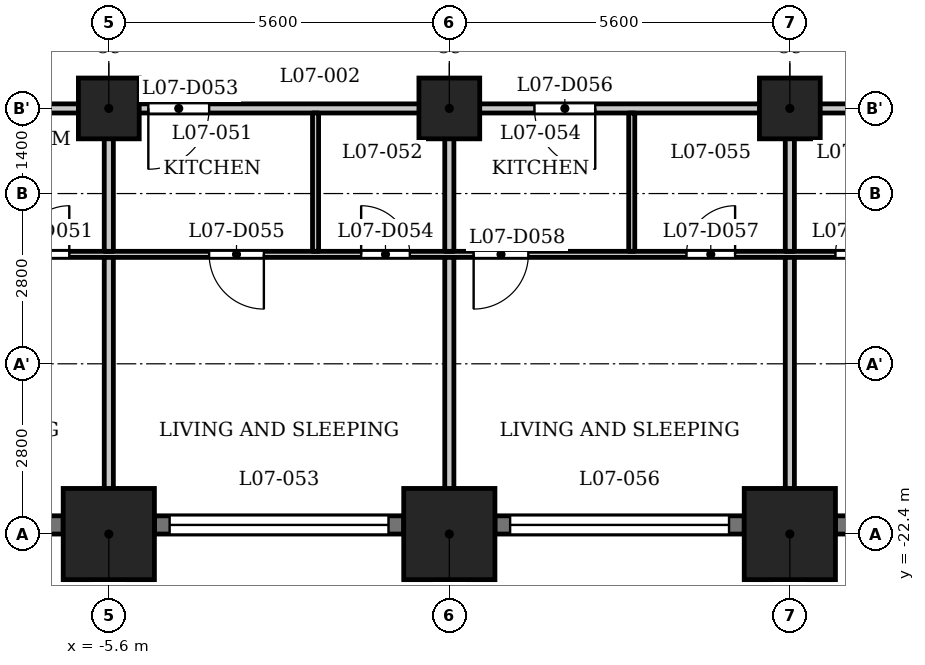
"""IFC4 building model, lengths in metres.
Left out: names, types, materials, properties, quantities, classifications, styles, units other than length and angle.
Written with IfcOpenShell. Run it as: python <this file> out.ifc"""

import sys

from ifc_helpers import new_model, si_unit, direction, frame, frame_2d, origin, origin_2d, place, context, subcontext, project, spatial, rectangle, extrude, element, fill, save


model = new_model("IFC4")
c1 = context("Model", 3, precision=1e-05, world=origin(), true_north=direction((0.0, 1.0)))
c2 = subcontext(c1, "Body", "Model", "MODEL_VIEW")
j1 = project(units=[si_unit("LENGTHUNIT", "METRE"), si_unit("PLANEANGLEUNIT", "RADIAN")], contexts=[c1])
p1 = place(None, origin())
s1 = spatial("IfcSite", under=j1, at=p1, CompositionType="ELEMENT")
p2 = place(p1, origin())
s2 = spatial("IfcBuilding", under=s1, at=p2, CompositionType="ELEMENT")
p3 = place(p2, frame((0.0, 0.0, 34.0)))
s3 = spatial("IfcBuildingStorey", under=s2, at=p3, CompositionType="ELEMENT", Elevation=34.0)
for number, where, z_axis, x_axis in (
    (1, (-5.6, -22.4, 0.0), (0.0, 0.0, 1.0), (1.0, 0.0, 0.0)),
    (2, (0.0, -22.4, 0.0), (0.0, 0.0, 1.0), (1.0, 0.0, 0.0)),
    (3, (5.6, -22.4, 0.0), (0.0, 0.0, 1.0), (1.0, 0.0, 0.0)),
):
    element("IfcColumn", number, at=place(p3, frame(where, z_axis=z_axis, x_axis=x_axis)), inside=s3, PredefinedType="COLUMN", context=c2, shape_type="SweptSolid", body=[
        extrude(rectangle(XDim=1.5, YDim=1.5, at=origin_2d()), origin(), (0.0, 0.0, 1.0), 3.5),
    ])
for number, where, z_axis, x_axis in (
    (4, (-5.6, -15.4, 0.0), (0.0, 0.0, 1.0), (1.0, 0.0, 0.0)),
    (5, (0.0, -15.4, 0.0), (0.0, 0.0, 1.0), (1.0, 0.0, 0.0)),
    (6, (5.6, -15.4, 0.0), (0.0, 0.0, 1.0), (1.0, 0.0, 0.0)),
):
    element("IfcColumn", number, at=place(p3, frame(where, z_axis=z_axis, x_axis=x_axis)), inside=s3, PredefinedType="COLUMN", context=c2, shape_type="SweptSolid", body=[
        extrude(rectangle(XDim=1.0, YDim=1.0, at=origin_2d()), origin(), (0.0, 0.0, 1.0), 3.5),
    ])
p4 = place(p3, frame((-10.45, -22.25, 0.0), z_axis=(0.0, 0.0, 1.0), x_axis=(1.0, 0.0, 0.0)))
e7 = element("IfcWall", 7, at=p4, inside=s3, PredefinedType="SOLIDWALL", context=c2, shape_type="SweptSolid", body=[
    extrude(rectangle(XDim=4.1, YDim=0.3, at=frame_2d((2.05, 0.0))), origin(), (0.0, 0.0, 1.0), 2.35),
])
p5 = place(p4, frame((0.25, 0.0, 1.2)))
e8 = element("IfcOpeningElement", 8, at=p5, cuts=e7, PredefinedType="OPENING", context=c2, shape_type="SweptSolid", body=[
    extrude(rectangle(XDim=3.6, YDim=0.95, at=frame_2d((1.8, 0.475))), frame((0.0, 0.16, 0.0), z_axis=(0.0, -1.0, 0.0), x_axis=(1.0, 0.0, 0.0)), (0.0, 0.0, 1.0), 0.32),
])
p6 = place(p3, frame((-4.85, -22.25, 0.0), z_axis=(0.0, 0.0, 1.0), x_axis=(1.0, 0.0, 0.0)))
e9 = element("IfcWall", 9, at=p6, inside=s3, PredefinedType="SOLIDWALL", context=c2, shape_type="SweptSolid", body=[
    extrude(rectangle(XDim=4.1, YDim=0.3, at=frame_2d((2.05, 0.0))), origin(), (0.0, 0.0, 1.0), 2.35),
])
p7 = place(p6, frame((0.25, 0.0, 1.2)))
e10 = element("IfcOpeningElement", 10, at=p7, cuts=e9, PredefinedType="OPENING", context=c2, shape_type="SweptSolid", body=[
    extrude(rectangle(XDim=3.6, YDim=0.95, at=frame_2d((1.8, 0.475))), frame((0.0, 0.16, 0.0), z_axis=(0.0, -1.0, 0.0), x_axis=(1.0, 0.0, 0.0)), (0.0, 0.0, 1.0), 0.32),
])
p8 = place(p3, frame((0.75, -22.25, 0.0), z_axis=(0.0, 0.0, 1.0), x_axis=(1.0, 0.0, 0.0)))
e11 = element("IfcWall", 11, at=p8, inside=s3, PredefinedType="SOLIDWALL", context=c2, shape_type="SweptSolid", body=[
    extrude(rectangle(XDim=4.1, YDim=0.3, at=frame_2d((2.05, 0.0))), origin(), (0.0, 0.0, 1.0), 2.35),
])
p9 = place(p8, frame((0.25, 0.0, 1.2)))
e12 = element("IfcOpeningElement", 12, at=p9, cuts=e11, PredefinedType="OPENING", context=c2, shape_type="SweptSolid", body=[
    extrude(rectangle(XDim=3.6, YDim=0.95, at=frame_2d((1.8, 0.475))), frame((0.0, 0.16, 0.0), z_axis=(0.0, -1.0, 0.0), x_axis=(1.0, 0.0, 0.0)), (0.0, 0.0, 1.0), 0.32),
])
p10 = place(p3, frame((6.35, -22.25, 0.0), z_axis=(0.0, 0.0, 1.0), x_axis=(1.0, 0.0, 0.0)))
e13 = element("IfcWall", 13, at=p10, inside=s3, PredefinedType="SOLIDWALL", context=c2, shape_type="SweptSolid", body=[
    extrude(rectangle(XDim=4.1, YDim=0.3, at=frame_2d((2.05, 0.0))), origin(), (0.0, 0.0, 1.0), 2.35),
])
p11 = place(p10, frame((0.75, 0.0, 0.9)))
e14 = element("IfcOpeningElement", 14, at=p11, cuts=e13, PredefinedType="OPENING", context=c2, shape_type="SweptSolid", body=[
    extrude(rectangle(XDim=2.6, YDim=1.25, at=frame_2d((1.3, 0.625))), frame((0.0, 0.16, 0.0), z_axis=(0.0, -1.0, 0.0), x_axis=(1.0, 0.0, 0.0)), (0.0, 0.0, 1.0), 0.32),
])
p12 = place(p3, frame((-26.394, -17.8, 0.0), z_axis=(0.0, 0.0, 1.0), x_axis=(1.0, 0.0, 0.0)))
e15 = element("IfcWall", 15, at=p12, inside=s3, PredefinedType="PARTITIONING", context=c2, shape_type="SweptSolid", body=[
    extrude(rectangle(XDim=53.126, YDim=0.1, at=frame_2d((26.563, 0.0))), origin(), (0.0, 0.0, 1.0), 3.2),
])
p13 = place(p12, frame((0.794, 0.0, 0.0)))
e16 = element("IfcOpeningElement", 16, at=p13, cuts=e15, PredefinedType="OPENING", context=c2, shape_type="SweptSolid", body=[
    extrude(rectangle(XDim=0.8, YDim=2.1, at=frame_2d((0.4, 1.05))), frame((0.0, 0.06, 0.0), z_axis=(0.0, -1.0, 0.0), x_axis=(1.0, 0.0, 0.0)), (0.0, 0.0, 1.0), 0.12),
])
p14 = place(p12, frame((5.644, 0.0, 0.0)))
e17 = element("IfcOpeningElement", 17, at=p14, cuts=e15, PredefinedType="OPENING", context=c2, shape_type="SweptSolid", body=[
    extrude(rectangle(XDim=0.9, YDim=2.1, at=frame_2d((0.45, 1.05))), frame((0.0, 0.06, 0.0), z_axis=(0.0, -1.0, 0.0), x_axis=(1.0, 0.0, 0.0)), (0.0, 0.0, 1.0), 0.12),
])
p15 = place(p12, frame((13.244, 0.0, 0.0)))
e18 = element("IfcOpeningElement", 18, at=p15, cuts=e15, PredefinedType="OPENING", context=c2, shape_type="SweptSolid", body=[
    extrude(rectangle(XDim=0.8, YDim=2.1, at=frame_2d((0.4, 1.05))), frame((0.0, 0.06, 0.0), z_axis=(0.0, -1.0, 0.0), x_axis=(1.0, 0.0, 0.0)), (0.0, 0.0, 1.0), 0.12),
])
p16 = place(p12, frame((11.494, 0.0, 0.0)))
e19 = element("IfcOpeningElement", 19, at=p16, cuts=e15, PredefinedType="OPENING", context=c2, shape_type="SweptSolid", body=[
    extrude(rectangle(XDim=0.9, YDim=2.1, at=frame_2d((0.45, 1.05))), frame((0.0, 0.06, 0.0), z_axis=(0.0, -1.0, 0.0), x_axis=(1.0, 0.0, 0.0)), (0.0, 0.0, 1.0), 0.12),
])
p17 = place(p12, frame((19.344, 0.0, 0.0)))
e20 = element("IfcOpeningElement", 20, at=p17, cuts=e15, PredefinedType="OPENING", context=c2, shape_type="SweptSolid", body=[
    extrude(rectangle(XDim=0.8, YDim=2.1, at=frame_2d((0.4, 1.05))), frame((0.0, 0.06, 0.0), z_axis=(0.0, -1.0, 0.0), x_axis=(1.0, 0.0, 0.0)), (0.0, 0.0, 1.0), 0.12),
])
p18 = place(p12, frame((16.094, 0.0, 0.0)))
e21 = element("IfcOpeningElement", 21, at=p18, cuts=e15, PredefinedType="OPENING", context=c2, shape_type="SweptSolid", body=[
    extrude(rectangle(XDim=0.9, YDim=2.1, at=frame_2d((0.45, 1.05))), frame((0.0, 0.06, 0.0), z_axis=(0.0, -1.0, 0.0), x_axis=(1.0, 0.0, 0.0)), (0.0, 0.0, 1.0), 0.12),
])
p19 = place(p12, frame((24.944, 0.0, 0.0)))
e22 = element("IfcOpeningElement", 22, at=p19, cuts=e15, PredefinedType="OPENING", context=c2, shape_type="SweptSolid", body=[
    extrude(rectangle(XDim=0.8, YDim=2.1, at=frame_2d((0.4, 1.05))), frame((0.0, 0.06, 0.0), z_axis=(0.0, -1.0, 0.0), x_axis=(1.0, 0.0, 0.0)), (0.0, 0.0, 1.0), 0.12),
])
p20 = place(p12, frame((22.444, 0.0, 0.0)))
e23 = element("IfcOpeningElement", 23, at=p20, cuts=e15, PredefinedType="OPENING", context=c2, shape_type="SweptSolid", body=[
    extrude(rectangle(XDim=0.9, YDim=2.1, at=frame_2d((0.45, 1.05))), frame((0.0, 0.06, 0.0), z_axis=(0.0, -1.0, 0.0), x_axis=(1.0, 0.0, 0.0)), (0.0, 0.0, 1.0), 0.12),
])
p21 = place(p12, frame((30.294, 0.0, 0.0)))
e24 = element("IfcOpeningElement", 24, at=p21, cuts=e15, PredefinedType="OPENING", context=c2, shape_type="SweptSolid", body=[
    extrude(rectangle(XDim=0.8, YDim=2.1, at=frame_2d((0.4, 1.05))), frame((0.0, 0.06, 0.0), z_axis=(0.0, -1.0, 0.0), x_axis=(1.0, 0.0, 0.0)), (0.0, 0.0, 1.0), 0.12),
])
p22 = place(p12, frame((26.794, 0.0, 0.0)))
e25 = element("IfcOpeningElement", 25, at=p22, cuts=e15, PredefinedType="OPENING", context=c2, shape_type="SweptSolid", body=[
    extrude(rectangle(XDim=0.9, YDim=2.1, at=frame_2d((0.45, 1.05))), frame((0.0, 0.06, 0.0), z_axis=(0.0, -1.0, 0.0), x_axis=(1.0, 0.0, 0.0)), (0.0, 0.0, 1.0), 0.12),
])
p23 = place(p12, frame((32.744, 0.0, 0.0)))
e26 = element("IfcOpeningElement", 26, at=p23, cuts=e15, PredefinedType="OPENING", context=c2, shape_type="SweptSolid", body=[
    extrude(rectangle(XDim=0.8, YDim=2.1, at=frame_2d((0.4, 1.05))), frame((0.0, 0.06, 0.0), z_axis=(0.0, -1.0, 0.0), x_axis=(1.0, 0.0, 0.0)), (0.0, 0.0, 1.0), 0.12),
])
p24 = place(p12, frame((35.594, 0.0, 0.0)))
e27 = element("IfcOpeningElement", 27, at=p24, cuts=e15, PredefinedType="OPENING", context=c2, shape_type="SweptSolid", body=[
    extrude(rectangle(XDim=0.9, YDim=2.1, at=frame_2d((0.45, 1.05))), frame((0.0, 0.06, 0.0), z_axis=(0.0, -1.0, 0.0), x_axis=(1.0, 0.0, 0.0)), (0.0, 0.0, 1.0), 0.12),
])
p25 = place(p12, frame((39.244, 0.0, 0.0)))
e28 = element("IfcOpeningElement", 28, at=p25, cuts=e15, PredefinedType="OPENING", context=c2, shape_type="SweptSolid", body=[
    extrude(rectangle(XDim=0.9, YDim=2.1, at=frame_2d((0.45, 1.05))), frame((0.0, 0.06, 0.0), z_axis=(0.0, -1.0, 0.0), x_axis=(1.0, 0.0, 0.0)), (0.0, 0.0, 1.0), 0.12),
])
p26 = place(p12, frame((41.544, 0.0, 0.0)))
e29 = element("IfcOpeningElement", 29, at=p26, cuts=e15, PredefinedType="OPENING", context=c2, shape_type="SweptSolid", body=[
    extrude(rectangle(XDim=0.9, YDim=2.1, at=frame_2d((0.45, 1.05))), frame((0.0, 0.06, 0.0), z_axis=(0.0, -1.0, 0.0), x_axis=(1.0, 0.0, 0.0)), (0.0, 0.0, 1.0), 0.12),
])
p27 = place(p12, frame((49.362, 0.0, 0.0)))
e30 = element("IfcOpeningElement", 30, at=p27, cuts=e15, PredefinedType="OPENING", context=c2, shape_type="SweptSolid", body=[
    extrude(rectangle(XDim=0.8, YDim=2.1, at=frame_2d((0.4, 1.05))), frame((0.0, 0.06, 0.0), z_axis=(0.0, -1.0, 0.0), x_axis=(1.0, 0.0, 0.0)), (0.0, 0.0, 1.0), 0.12),
])
p28 = place(p12, frame((45.094, 0.0, 0.0)))
e31 = element("IfcOpeningElement", 31, at=p28, cuts=e15, PredefinedType="OPENING", context=c2, shape_type="SweptSolid", body=[
    extrude(rectangle(XDim=0.9, YDim=2.1, at=frame_2d((0.45, 1.05))), frame((0.0, 0.06, 0.0), z_axis=(0.0, -1.0, 0.0), x_axis=(1.0, 0.0, 0.0)), (0.0, 0.0, 1.0), 0.12),
])
p29 = place(p3, frame((-27.484, -15.4, 0.0), z_axis=(0.0, 0.0, 1.0), x_axis=(1.0, 0.0, 0.0)))
e32 = element("IfcWall", 32, at=p29, inside=s3, PredefinedType="PARTITIONING", context=c2, shape_type="SweptSolid", body=[
    extrude(rectangle(XDim=54.968, YDim=0.15, at=frame_2d((27.484, 0.0))), origin(), (0.0, 0.0, 1.0), 3.2),
])
p30 = place(p29, frame((5.734, 0.0, 0.0)))
e33 = element("IfcOpeningElement", 33, at=p30, cuts=e32, PredefinedType="OPENING", context=c2, shape_type="SweptSolid", body=[
    extrude(rectangle(XDim=1.0, YDim=2.1, at=frame_2d((0.5, 1.05))), frame((0.0, 0.085, 0.0), z_axis=(0.0, -1.0, 0.0), x_axis=(1.0, 0.0, 0.0)), (0.0, 0.0, 1.0), 0.17),
])
p31 = place(p29, frame((11.584, 0.0, 0.0)))
e34 = element("IfcOpeningElement", 34, at=p31, cuts=e32, PredefinedType="OPENING", context=c2, shape_type="SweptSolid", body=[
    extrude(rectangle(XDim=1.0, YDim=2.1, at=frame_2d((0.5, 1.05))), frame((0.0, 0.085, 0.0), z_axis=(0.0, -1.0, 0.0), x_axis=(1.0, 0.0, 0.0)), (0.0, 0.0, 1.0), 0.17),
])
p32 = place(p29, frame((17.184, 0.0, 0.0)))
e35 = element("IfcOpeningElement", 35, at=p32, cuts=e32, PredefinedType="OPENING", context=c2, shape_type="SweptSolid", body=[
    extrude(rectangle(XDim=1.0, YDim=2.1, at=frame_2d((0.5, 1.05))), frame((0.0, 0.085, 0.0), z_axis=(0.0, -1.0, 0.0), x_axis=(1.0, 0.0, 0.0)), (0.0, 0.0, 1.0), 0.17),
])
p33 = place(p29, frame((22.534, 0.0, 0.0)))
e36 = element("IfcOpeningElement", 36, at=p33, cuts=e32, PredefinedType="OPENING", context=c2, shape_type="SweptSolid", body=[
    extrude(rectangle(XDim=1.0, YDim=2.1, at=frame_2d((0.5, 1.05))), frame((0.0, 0.085, 0.0), z_axis=(0.0, -1.0, 0.0), x_axis=(1.0, 0.0, 0.0)), (0.0, 0.0, 1.0), 0.17),
])
p34 = place(p29, frame((28.884, 0.0, 0.0)))
e37 = element("IfcOpeningElement", 37, at=p34, cuts=e32, PredefinedType="OPENING", context=c2, shape_type="SweptSolid", body=[
    extrude(rectangle(XDim=1.0, YDim=2.1, at=frame_2d((0.5, 1.05))), frame((0.0, 0.085, 0.0), z_axis=(0.0, -1.0, 0.0), x_axis=(1.0, 0.0, 0.0)), (0.0, 0.0, 1.0), 0.17),
])
p35 = place(p29, frame((39.334, 0.0, 0.0)))
e38 = element("IfcOpeningElement", 38, at=p35, cuts=e32, PredefinedType="OPENING", context=c2, shape_type="SweptSolid", body=[
    extrude(rectangle(XDim=1.0, YDim=2.1, at=frame_2d((0.5, 1.05))), frame((0.0, 0.085, 0.0), z_axis=(0.0, -1.0, 0.0), x_axis=(1.0, 0.0, 0.0)), (0.0, 0.0, 1.0), 0.17),
])
p36 = place(p29, frame((45.184, 0.0, 0.0)))
e39 = element("IfcOpeningElement", 39, at=p36, cuts=e32, PredefinedType="OPENING", context=c2, shape_type="SweptSolid", body=[
    extrude(rectangle(XDim=1.0, YDim=2.1, at=frame_2d((0.5, 1.05))), frame((0.0, 0.085, 0.0), z_axis=(0.0, -1.0, 0.0), x_axis=(1.0, 0.0, 0.0)), (0.0, 0.0, 1.0), 0.17),
])
p37 = place(p3, frame((-5.6, -23.13, 0.0), z_axis=(0.0, 0.0, 1.0), x_axis=(0.0, 1.0, 0.0)))
e40 = element("IfcWall", 40, at=p37, inside=s3, PredefinedType="PARTITIONING", context=c2, shape_type="SweptSolid", body=[
    extrude(rectangle(XDim=5.28, YDim=0.15, at=frame_2d((2.64, 0.0))), origin(), (0.0, 0.0, 1.0), 3.2),
])
p38 = place(p3, frame((-5.6, -17.75, 0.0), z_axis=(0.0, 0.0, 1.0), x_axis=(0.0, 1.0, 0.0)))
e41 = element("IfcWall", 41, at=p38, inside=s3, PredefinedType="PARTITIONING", context=c2, shape_type="SweptSolid", body=[
    extrude(rectangle(XDim=2.275, YDim=0.15, at=frame_2d((1.137, 0.0))), origin(), (0.0, 0.0, 1.0), 3.2),
])
p39 = place(p3, frame((-2.2, -17.75, 0.0), z_axis=(0.0, 0.0, 1.0), x_axis=(0.0, 1.0, 0.0)))
e42 = element("IfcWall", 42, at=p39, inside=s3, PredefinedType="PARTITIONING", context=c2, shape_type="SweptSolid", body=[
    extrude(rectangle(XDim=2.275, YDim=0.1, at=frame_2d((1.137, 0.0))), origin(), (0.0, 0.0, 1.0), 3.2),
])
p40 = place(p3, frame((0.0, -23.13, 0.0), z_axis=(0.0, 0.0, 1.0), x_axis=(0.0, 1.0, 0.0)))
e43 = element("IfcWall", 43, at=p40, inside=s3, PredefinedType="PARTITIONING", context=c2, shape_type="SweptSolid", body=[
    extrude(rectangle(XDim=5.28, YDim=0.15, at=frame_2d((2.64, 0.0))), origin(), (0.0, 0.0, 1.0), 3.2),
])
p41 = place(p3, frame((0.0, -17.75, 0.0), z_axis=(0.0, 0.0, 1.0), x_axis=(0.0, 1.0, 0.0)))
e44 = element("IfcWall", 44, at=p41, inside=s3, PredefinedType="PARTITIONING", context=c2, shape_type="SweptSolid", body=[
    extrude(rectangle(XDim=2.275, YDim=0.15, at=frame_2d((1.137, 0.0))), origin(), (0.0, 0.0, 1.0), 3.2),
])
p42 = place(p3, frame((3.0, -17.75, 0.0), z_axis=(0.0, 0.0, 1.0), x_axis=(0.0, 1.0, 0.0)))
e45 = element("IfcWall", 45, at=p42, inside=s3, PredefinedType="PARTITIONING", context=c2, shape_type="SweptSolid", body=[
    extrude(rectangle(XDim=2.275, YDim=0.1, at=frame_2d((1.137, 0.0))), origin(), (0.0, 0.0, 1.0), 3.2),
])
p43 = place(p3, frame((5.6, -23.13, 0.0), z_axis=(0.0, 0.0, 1.0), x_axis=(0.0, 1.0, 0.0)))
e46 = element("IfcWall", 46, at=p43, inside=s3, PredefinedType="PARTITIONING", context=c2, shape_type="SweptSolid", body=[
    extrude(rectangle(XDim=5.28, YDim=0.15, at=frame_2d((2.64, 0.0))), origin(), (0.0, 0.0, 1.0), 3.2),
])
p44 = place(p3, frame((5.6, -17.75, 0.0), z_axis=(0.0, 0.0, 1.0), x_axis=(0.0, 1.0, 0.0)))
e47 = element("IfcWall", 47, at=p44, inside=s3, PredefinedType="PARTITIONING", context=c2, shape_type="SweptSolid", body=[
    extrude(rectangle(XDim=2.275, YDim=0.15, at=frame_2d((1.137, 0.0))), origin(), (0.0, 0.0, 1.0), 3.2),
])
p45 = place(p17, origin())
e48 = element("IfcDoor", 48, at=p45, inside=s3, OperationType="SINGLE_SWING_LEFT", PredefinedType="DOOR", context=c2, shape_type="SweptSolid", body=[
    extrude(rectangle(XDim=0.8, YDim=2.1, at=frame_2d((0.4, 1.05))), frame((0.0, 0.025, 0.0), z_axis=(0.0, -1.0, 0.0), x_axis=(1.0, 0.0, 0.0)), (0.0, 0.0, 1.0), 0.05),
])
fill(e20, e48)
p46 = place(p33, origin())
e49 = element("IfcDoor", 49, at=p46, inside=s3, OperationType="SINGLE_SWING_LEFT", PredefinedType="DOOR", context=c2, shape_type="SweptSolid", body=[
    extrude(rectangle(XDim=1.0, YDim=2.1, at=frame_2d((0.5, 1.05))), frame((0.0, 0.025, 0.0), z_axis=(0.0, -1.0, 0.0), x_axis=(1.0, 0.0, 0.0)), (0.0, 0.0, 1.0), 0.05),
])
fill(e36, e49)
p47 = place(p19, origin())
e50 = element("IfcDoor", 50, at=p47, inside=s3, OperationType="SINGLE_SWING_RIGHT", PredefinedType="DOOR", context=c2, shape_type="SweptSolid", body=[
    extrude(rectangle(XDim=0.8, YDim=2.1, at=frame_2d((0.4, 1.05))), frame((0.0, 0.025, 0.0), z_axis=(0.0, -1.0, 0.0), x_axis=(1.0, 0.0, 0.0)), (0.0, 0.0, 1.0), 0.05),
])
fill(e22, e50)
p48 = place(p20, origin())
e51 = element("IfcDoor", 51, at=p48, inside=s3, OperationType="SINGLE_SWING_RIGHT", PredefinedType="DOOR", context=c2, shape_type="SweptSolid", body=[
    extrude(rectangle(XDim=0.9, YDim=2.1, at=frame_2d((0.45, 1.05))), frame((0.0, 0.025, 0.0), z_axis=(0.0, -1.0, 0.0), x_axis=(1.0, 0.0, 0.0)), (0.0, 0.0, 1.0), 0.05),
])
fill(e23, e51)
p49 = place(p34, origin())
e52 = element("IfcDoor", 52, at=p49, inside=s3, OperationType="SINGLE_SWING_RIGHT", PredefinedType="DOOR", context=c2, shape_type="SweptSolid", body=[
    extrude(rectangle(XDim=1.0, YDim=2.1, at=frame_2d((0.5, 1.05))), frame((0.0, 0.025, 0.0), z_axis=(0.0, -1.0, 0.0), x_axis=(1.0, 0.0, 0.0)), (0.0, 0.0, 1.0), 0.05),
])
fill(e37, e52)
p50 = place(p21, origin())
e53 = element("IfcDoor", 53, at=p50, inside=s3, OperationType="SINGLE_SWING_LEFT", PredefinedType="DOOR", context=c2, shape_type="SweptSolid", body=[
    extrude(rectangle(XDim=0.8, YDim=2.1, at=frame_2d((0.4, 1.05))), frame((0.0, 0.025, 0.0), z_axis=(0.0, -1.0, 0.0), x_axis=(1.0, 0.0, 0.0)), (0.0, 0.0, 1.0), 0.05),
])
fill(e24, e53)
p51 = place(p22, origin())
e54 = element("IfcDoor", 54, at=p51, inside=s3, OperationType="SINGLE_SWING_LEFT", PredefinedType="DOOR", context=c2, shape_type="SweptSolid", body=[
    extrude(rectangle(XDim=0.9, YDim=2.1, at=frame_2d((0.45, 1.05))), frame((0.0, 0.025, 0.0), z_axis=(0.0, -1.0, 0.0), x_axis=(1.0, 0.0, 0.0)), (0.0, 0.0, 1.0), 0.05),
])
fill(e25, e54)
p52 = place(p23, origin())
e55 = element("IfcDoor", 55, at=p52, inside=s3, OperationType="SINGLE_SWING_LEFT", PredefinedType="DOOR", context=c2, shape_type="SweptSolid", body=[
    extrude(rectangle(XDim=0.8, YDim=2.1, at=frame_2d((0.4, 1.05))), frame((0.0, 0.025, 0.0), z_axis=(0.0, -1.0, 0.0), x_axis=(1.0, 0.0, 0.0)), (0.0, 0.0, 1.0), 0.05),
])
fill(e26, e55)
p53 = place(p7, origin())
e56 = element("IfcWindow", 56, at=p53, inside=s3, PartitioningType="SINGLE_PANEL", PredefinedType="WINDOW", context=c2, shape_type="SweptSolid", body=[
    extrude(rectangle(XDim=3.6, YDim=0.95, at=frame_2d((1.8, 0.475))), frame((0.0, 0.03, 0.0), z_axis=(0.0, -1.0, 0.0), x_axis=(1.0, 0.0, 0.0)), (0.0, 0.0, 1.0), 0.06),
])
fill(e10, e56)
p54 = place(p9, origin())
e57 = element("IfcWindow", 57, at=p54, inside=s3, PartitioningType="SINGLE_PANEL", PredefinedType="WINDOW", context=c2, shape_type="SweptSolid", body=[
    extrude(rectangle(XDim=3.6, YDim=0.95, at=frame_2d((1.8, 0.475))), frame((0.0, 0.03, 0.0), z_axis=(0.0, -1.0, 0.0), x_axis=(1.0, 0.0, 0.0)), (0.0, 0.0, 1.0), 0.06),
])
fill(e12, e57)
save(model, sys.argv[1])
